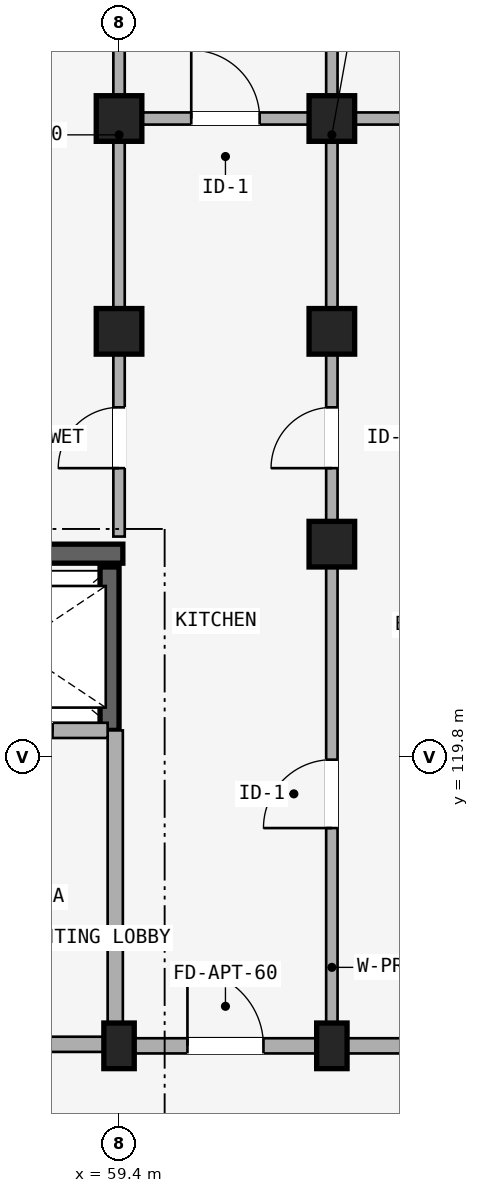
"""IFC4 building model, lengths in metres.
Left out: names, types, materials, properties, quantities, classifications, styles, units other than length and angle.
Written with IfcOpenShell. Run it as: python <this file> out.ifc"""

import sys

from ifc_helpers import new_model, si_unit, direction, frame, frame_2d, origin, origin_2d, place, context, subcontext, project, spatial, rectangle, extrude, element, fill, save


model = new_model("IFC4")
c1 = context("Model", 3, precision=1e-05, world=origin(), true_north=direction((0.0, 1.0)))
c2 = subcontext(c1, "Body", "Model", "MODEL_VIEW")
j1 = project(units=[si_unit("LENGTHUNIT", "METRE"), si_unit("PLANEANGLEUNIT", "RADIAN")], contexts=[c1])
p1 = place(None, origin())
s1 = spatial("IfcSite", under=j1, at=p1, CompositionType="ELEMENT")
p2 = place(p1, origin())
s2 = spatial("IfcBuilding", under=s1, at=p2, CompositionType="ELEMENT")
p3 = place(p2, frame((0.0, 0.0, 40.2)))
s3 = spatial("IfcBuildingStorey", under=s2, at=p3, CompositionType="ELEMENT", Elevation=40.2)
p4 = place(p3, frame((56.65, 122.475, 0.0), z_axis=(0.0, 0.0, 1.0), x_axis=(1.0, 0.0, 0.0)))
e1 = element("IfcWall", 1, at=p4, inside=s3, PredefinedType="SHEAR", context=c2, shape_type="SweptSolid", body=[
    extrude(rectangle(XDim=2.8, YDim=0.25, at=frame_2d((1.4, 0.0))), origin(), (0.0, 0.0, 1.0), 2.93),
])
p5 = place(p3, frame((59.275, 120.15, 0.0), z_axis=(0.0, 0.0, 1.0), x_axis=(0.0, 1.0, 0.0)))
e2 = element("IfcWall", 2, at=p5, inside=s3, PredefinedType="SHEAR", context=c2, shape_type="SweptSolid", body=[
    extrude(rectangle(XDim=2.15, YDim=0.25, at=frame_2d((1.075, 0.0))), origin(), (0.0, 0.0, 1.0), 2.93),
])
p6 = place(p3, frame((59.4, 116.0, 0.0), z_axis=(0.0, 0.0, 1.0), x_axis=(1.0, 0.0, 0.0)))
e3 = element("IfcColumn", 3, at=p6, inside=s3, PredefinedType="COLUMN", context=c2, shape_type="SweptSolid", body=[
    extrude(rectangle(XDim=0.4, YDim=0.6, at=origin_2d()), origin(), (0.0, 0.0, 1.0), 2.93),
])
for number, where, z_axis, x_axis in (
    (4, (59.4, 125.4, 0.0), (0.0, 0.0, 1.0), (1.0, 0.0, 0.0)),
    (5, (59.4, 128.2, 0.0), (0.0, 0.0, 1.0), (1.0, 0.0, 0.0)),
):
    element("IfcColumn", number, at=place(p3, frame(where, z_axis=z_axis, x_axis=x_axis)), inside=s3, PredefinedType="COLUMN", context=c2, shape_type="SweptSolid", body=[
        extrude(rectangle(XDim=0.6, YDim=0.6, at=origin_2d()), origin(), (0.0, 0.0, 1.0), 2.93),
    ])
p7 = place(p3, frame((62.2, 116.0, 0.0), z_axis=(0.0, 0.0, 1.0), x_axis=(1.0, 0.0, 0.0)))
e6 = element("IfcColumn", 6, at=p7, inside=s3, PredefinedType="COLUMN", context=c2, shape_type="SweptSolid", body=[
    extrude(rectangle(XDim=0.4, YDim=0.6, at=origin_2d()), origin(), (0.0, 0.0, 1.0), 2.93),
])
for number, where, z_axis, x_axis in (
    (7, (62.2, 122.6, 0.0), (0.0, 0.0, 1.0), (1.0, 0.0, 0.0)),
    (8, (62.2, 125.4, 0.0), (0.0, 0.0, 1.0), (1.0, 0.0, 0.0)),
    (9, (62.2, 128.2, 0.0), (0.0, 0.0, 1.0), (1.0, 0.0, 0.0)),
):
    element("IfcColumn", number, at=place(p3, frame(where, z_axis=z_axis, x_axis=x_axis)), inside=s3, PredefinedType="COLUMN", context=c2, shape_type="SweptSolid", body=[
        extrude(rectangle(XDim=0.6, YDim=0.6, at=origin_2d()), origin(), (0.0, 0.0, 1.0), 2.93),
    ])
p8 = place(p3, frame((53.7, 116.02, 0.0), z_axis=(0.0, 0.0, 1.0), x_axis=(1.0, 0.0, 0.0)))
e10 = element("IfcWall", 10, at=p8, inside=s3, PredefinedType="STANDARD", context=c2, shape_type="SweptSolid", body=[
    extrude(rectangle(XDim=5.65, YDim=0.2, at=frame_2d((2.825, 0.0))), origin(), (0.0, 0.0, 1.0), 2.372),
])
p9 = place(p8, frame((1.923, 0.0, 0.0)))
e11 = element("IfcOpeningElement", 11, at=p9, cuts=e10, PredefinedType="OPENING", context=c2, shape_type="SweptSolid", body=[
    extrude(rectangle(XDim=1.24, YDim=2.15, at=frame_2d((0.62, 1.075))), frame((0.0, 0.11, 0.0), z_axis=(0.0, -1.0, 0.0), x_axis=(1.0, 0.0, 0.0)), (0.0, 0.0, 1.0), 0.22),
])
p10 = place(p3, frame((59.35, 116.02, 0.0), z_axis=(0.0, 0.0, 1.0), x_axis=(0.0, 1.0, 0.0)))
e12 = element("IfcWall", 12, at=p10, inside=s3, PredefinedType="STANDARD", context=c2, shape_type="SweptSolid", body=[
    extrude(rectangle(XDim=4.13, YDim=0.2, at=frame_2d((2.065, 0.0))), origin(), (0.0, 0.0, 1.0), 2.372),
])
p11 = place(p3, frame((56.7, 120.15, 0.0), z_axis=(0.0, 0.0, 1.0), x_axis=(1.0, 0.0, 0.0)))
e13 = element("IfcWall", 13, at=p11, inside=s3, PredefinedType="STANDARD", context=c2, shape_type="SweptSolid", body=[
    extrude(rectangle(XDim=2.55, YDim=0.2, at=frame_2d((1.275, 0.0))), origin(), (0.0, 0.0, 1.0), 2.372),
])
p12 = place(p11, frame((0.725, 0.0, 0.0)))
e14 = element("IfcOpeningElement", 14, at=p12, cuts=e13, PredefinedType="OPENING", context=c2, shape_type="SweptSolid", body=[
    extrude(rectangle(XDim=1.1, YDim=2.15, at=frame_2d((0.55, 1.075))), frame((0.0, 0.11, 0.0), z_axis=(0.0, -1.0, 0.0), x_axis=(1.0, 0.0, 0.0)), (0.0, 0.0, 1.0), 0.22),
])
p13 = place(p3, frame((59.4, 116.0, 0.0), z_axis=(0.0, 0.0, 1.0), x_axis=(1.0, 0.0, 0.0)))
e15 = element("IfcWall", 15, at=p13, inside=s3, PredefinedType="STANDARD", context=c2, shape_type="SweptSolid", body=[
    extrude(rectangle(XDim=2.8, YDim=0.2, at=frame_2d((1.4, 0.0))), origin(), (0.0, 0.0, 1.0), 2.372),
])
p14 = place(p13, frame((0.9, 0.0, 0.0)))
e16 = element("IfcOpeningElement", 16, at=p14, cuts=e15, PredefinedType="OPENING", context=c2, shape_type="SweptSolid", body=[
    extrude(rectangle(XDim=1.0, YDim=2.15, at=frame_2d((0.5, 1.075))), frame((0.0, 0.11, 0.0), z_axis=(0.0, -1.0, 0.0), x_axis=(1.0, 0.0, 0.0)), (0.0, 0.0, 1.0), 0.22),
])
p15 = place(p3, frame((59.48, 128.2, 0.0), z_axis=(0.0, 0.0, 1.0), x_axis=(1.0, 0.0, 0.0)))
e17 = element("IfcWall", 17, at=p15, inside=s3, PredefinedType="PLUMBINGWALL", context=c2, shape_type="SweptSolid", body=[
    extrude(rectangle(XDim=2.64, YDim=0.16, at=frame_2d((1.32, 0.0))), origin(), (0.0, 0.0, 1.0), 2.372),
])
p16 = place(p15, frame((0.87, 0.0, 0.0)))
e18 = element("IfcOpeningElement", 18, at=p16, cuts=e17, PredefinedType="OPENING", context=c2, shape_type="SweptSolid", body=[
    extrude(rectangle(XDim=0.9, YDim=2.1, at=frame_2d((0.45, 1.05))), frame((0.0, 0.09, 0.0), z_axis=(0.0, -1.0, 0.0), x_axis=(1.0, 0.0, 0.0)), (0.0, 0.0, 1.0), 0.18),
])
p17 = place(p3, frame((62.2, 116.0, 0.0), z_axis=(0.0, 0.0, 1.0), x_axis=(1.0, 0.0, 0.0)))
e19 = element("IfcWall", 19, at=p17, inside=s3, PredefinedType="STANDARD", context=c2, shape_type="SweptSolid", body=[
    extrude(rectangle(XDim=2.8, YDim=0.2, at=frame_2d((1.4, 0.0))), origin(), (0.0, 0.0, 1.0), 2.372),
])
p18 = place(p3, frame((62.28, 128.2, 0.0), z_axis=(0.0, 0.0, 1.0), x_axis=(1.0, 0.0, 0.0)))
e20 = element("IfcWall", 20, at=p18, inside=s3, PredefinedType="PLUMBINGWALL", context=c2, shape_type="SweptSolid", body=[
    extrude(rectangle(XDim=2.64, YDim=0.16, at=frame_2d((1.32, 0.0))), origin(), (0.0, 0.0, 1.0), 2.372),
])
p19 = place(p18, frame((0.92, 0.0, 0.0)))
e21 = element("IfcOpeningElement", 21, at=p19, cuts=e20, PredefinedType="OPENING", context=c2, shape_type="SweptSolid", body=[
    extrude(rectangle(XDim=0.8, YDim=2.1, at=frame_2d((0.4, 1.05))), frame((0.0, 0.09, 0.0), z_axis=(0.0, -1.0, 0.0), x_axis=(1.0, 0.0, 0.0)), (0.0, 0.0, 1.0), 0.18),
])
p20 = place(p3, frame((59.4, 122.7, 0.0), z_axis=(0.0, 0.0, 1.0), x_axis=(0.0, 1.0, 0.0)))
e22 = element("IfcWall", 22, at=p20, inside=s3, PredefinedType="PARTITIONING", context=c2, shape_type="SweptSolid", body=[
    extrude(rectangle(XDim=8.02, YDim=0.15, at=frame_2d((4.01, 0.0))), origin(), (0.0, 0.0, 1.0), 2.372),
])
p21 = place(p20, frame((0.9, 0.0, 0.0)))
e23 = element("IfcOpeningElement", 23, at=p21, cuts=e22, PredefinedType="OPENING", context=c2, shape_type="SweptSolid", body=[
    extrude(rectangle(XDim=0.8, YDim=2.1, at=frame_2d((0.4, 1.05))), frame((0.0, 0.085, 0.0), z_axis=(0.0, -1.0, 0.0), x_axis=(1.0, 0.0, 0.0)), (0.0, 0.0, 1.0), 0.17),
])
p22 = place(p3, frame((62.2, 116.05, 0.0), z_axis=(0.0, 0.0, 1.0), x_axis=(0.0, 1.0, 0.0)))
e24 = element("IfcWall", 24, at=p22, inside=s3, PredefinedType="PARTITIONING", context=c2, shape_type="SweptSolid", body=[
    extrude(rectangle(XDim=6.53, YDim=0.15, at=frame_2d((3.265, 0.0))), origin(), (0.0, 0.0, 1.0), 2.372),
])
p23 = place(p22, frame((2.815, 0.0, 0.0)))
e25 = element("IfcOpeningElement", 25, at=p23, cuts=e24, PredefinedType="OPENING", context=c2, shape_type="SweptSolid", body=[
    extrude(rectangle(XDim=0.9, YDim=2.1, at=frame_2d((0.45, 1.05))), frame((0.0, 0.085, 0.0), z_axis=(0.0, -1.0, 0.0), x_axis=(1.0, 0.0, 0.0)), (0.0, 0.0, 1.0), 0.17),
])
p24 = place(p3, frame((62.2, 122.7, 0.0), z_axis=(0.0, 0.0, 1.0), x_axis=(0.0, 1.0, 0.0)))
e26 = element("IfcWall", 26, at=p24, inside=s3, PredefinedType="PARTITIONING", context=c2, shape_type="SweptSolid", body=[
    extrude(rectangle(XDim=8.02, YDim=0.15, at=frame_2d((4.01, 0.0))), origin(), (0.0, 0.0, 1.0), 2.372),
])
p25 = place(p24, frame((0.9, 0.0, 0.0)))
e27 = element("IfcOpeningElement", 27, at=p25, cuts=e26, PredefinedType="OPENING", context=c2, shape_type="SweptSolid", body=[
    extrude(rectangle(XDim=0.8, YDim=2.1, at=frame_2d((0.4, 1.05))), frame((0.0, 0.085, 0.0), z_axis=(0.0, -1.0, 0.0), x_axis=(1.0, 0.0, 0.0)), (0.0, 0.0, 1.0), 0.17),
])
p26 = place(p12, origin())
e28 = element("IfcDoor", 28, at=p26, inside=s3, OperationType="SLIDING_TO_LEFT", PredefinedType="DOOR", context=c2, shape_type="SweptSolid", body=[
    extrude(rectangle(XDim=1.1, YDim=2.15, at=frame_2d((0.55, 1.075))), frame((0.0, 0.025, 0.0), z_axis=(0.0, -1.0, 0.0), x_axis=(1.0, 0.0, 0.0)), (0.0, 0.0, 1.0), 0.05),
])
fill(e14, e28)
p27 = place(p16, origin())
e29 = element("IfcDoor", 29, at=p27, inside=s3, OperationType="SINGLE_SWING_LEFT", PredefinedType="DOOR", context=c2, shape_type="SweptSolid", body=[
    extrude(rectangle(XDim=0.9, YDim=2.1, at=frame_2d((0.45, 1.05))), frame((0.0, 0.025, 0.0), z_axis=(0.0, -1.0, 0.0), x_axis=(1.0, 0.0, 0.0)), (0.0, 0.0, 1.0), 0.05),
])
fill(e18, e29)
p28 = place(p14, frame((1.0, 0.0, 0.0), z_axis=(0.0, 0.0, 1.0), x_axis=(-1.0, 0.0, 0.0)))
e30 = element("IfcDoor", 30, at=p28, inside=s3, OperationType="SINGLE_SWING_RIGHT", PredefinedType="DOOR", context=c2, shape_type="SweptSolid", body=[
    extrude(rectangle(XDim=1.0, YDim=2.15, at=frame_2d((0.5, 1.075))), frame((0.0, 0.025, 0.0), z_axis=(0.0, -1.0, 0.0), x_axis=(1.0, 0.0, 0.0)), (0.0, 0.0, 1.0), 0.05),
])
fill(e16, e30)
p29 = place(p21, frame((0.8, 0.0, 0.0), z_axis=(0.0, 0.0, 1.0), x_axis=(-1.0, 0.0, 0.0)))
e31 = element("IfcDoor", 31, at=p29, inside=s3, OperationType="SINGLE_SWING_RIGHT", PredefinedType="DOOR", context=c2, shape_type="SweptSolid", body=[
    extrude(rectangle(XDim=0.8, YDim=2.1, at=frame_2d((0.4, 1.05))), frame((0.0, 0.025, 0.0), z_axis=(0.0, -1.0, 0.0), x_axis=(1.0, 0.0, 0.0)), (0.0, 0.0, 1.0), 0.05),
])
fill(e23, e31)
p30 = place(p23, frame((0.9, 0.0, 0.0), z_axis=(0.0, 0.0, 1.0), x_axis=(-1.0, 0.0, 0.0)))
e32 = element("IfcDoor", 32, at=p30, inside=s3, OperationType="SINGLE_SWING_RIGHT", PredefinedType="DOOR", context=c2, shape_type="SweptSolid", body=[
    extrude(rectangle(XDim=0.9, YDim=2.1, at=frame_2d((0.45, 1.05))), frame((0.0, 0.025, 0.0), z_axis=(0.0, -1.0, 0.0), x_axis=(1.0, 0.0, 0.0)), (0.0, 0.0, 1.0), 0.05),
])
fill(e25, e32)
p31 = place(p25, origin())
e33 = element("IfcDoor", 33, at=p31, inside=s3, OperationType="SINGLE_SWING_LEFT", PredefinedType="DOOR", context=c2, shape_type="SweptSolid", body=[
    extrude(rectangle(XDim=0.8, YDim=2.1, at=frame_2d((0.4, 1.05))), frame((0.0, 0.025, 0.0), z_axis=(0.0, -1.0, 0.0), x_axis=(1.0, 0.0, 0.0)), (0.0, 0.0, 1.0), 0.05),
])
fill(e27, e33)
save(model, sys.argv[1])
